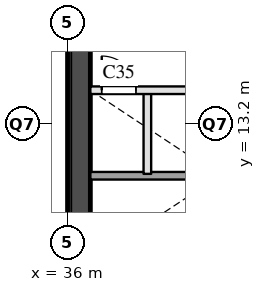
"""IFC4 building model, lengths in metres.
Left out: names, types, materials, properties, quantities, classifications, styles, units other than length and angle.
Written with IfcOpenShell. Run it as: python <this file> out.ifc"""

import sys

from ifc_helpers import new_model, si_unit, direction, frame, frame_2d, origin, place, context, subcontext, project, spatial, rectangle, extrude, element, fill, save


model = new_model("IFC4")
c1 = context("Model", 3, precision=1e-05, world=origin(), true_north=direction((0.0, 1.0)))
c2 = subcontext(c1, "Body", "Model", "MODEL_VIEW")
j1 = project(units=[si_unit("LENGTHUNIT", "METRE"), si_unit("PLANEANGLEUNIT", "RADIAN")], contexts=[c1])
p1 = place(None, origin())
s1 = spatial("IfcSite", under=j1, at=p1, CompositionType="ELEMENT")
p2 = place(p1, origin())
s2 = spatial("IfcBuilding", under=s1, at=p2, CompositionType="ELEMENT")
p3 = place(p2, frame((0.0, 0.0, 8.0)))
s3 = spatial("IfcBuildingStorey", under=s2, at=p3, CompositionType="ELEMENT", Elevation=8.0)
p4 = place(p3, frame((36.3, 9.6, 0.0), z_axis=(0.0, 0.0, 1.0), x_axis=(0.0, 1.0, 0.0)))
e1 = element("IfcWall", 1, at=p4, inside=s3, PredefinedType="SHEAR", context=c2, shape_type="SweptSolid", body=[
    extrude(rectangle(XDim=12.3, YDim=0.6, at=frame_2d((6.15, 0.0))), origin(), (0.0, 0.0, 1.0), 5.59),
])
p5 = place(p3, frame((38.1, 11.9, 0.0), z_axis=(0.0, 0.0, 1.0), x_axis=(0.0, 1.0, 0.0)))
e2 = element("IfcWall", 2, at=p5, inside=s3, PredefinedType="PARTITIONING", context=c2, shape_type="SweptSolid", body=[
    extrude(rectangle(XDim=2.2, YDim=0.2, at=frame_2d((1.1, 0.0))), origin(), (0.0, 0.0, 1.0), 5.59),
])
p6 = place(p3, frame((36.6, 11.85, 0.0), z_axis=(0.0, 0.0, 1.0), x_axis=(1.0, 0.0, 0.0)))
e3 = element("IfcWall", 3, at=p6, inside=s3, PredefinedType="SOLIDWALL", context=c2, shape_type="SweptSolid", body=[
    extrude(rectangle(XDim=7.8, YDim=0.2, at=frame_2d((3.9, 0.0))), origin(), (0.0, 0.0, 1.0), 5.59),
])
p7 = place(p3, frame((36.6, 14.1, 0.0), z_axis=(0.0, 0.0, 1.0), x_axis=(1.0, 0.0, 0.0)))
e4 = element("IfcWall", 4, at=p7, inside=s3, PredefinedType="PARTITIONING", context=c2, shape_type="SweptSolid", body=[
    extrude(rectangle(XDim=6.0, YDim=0.2, at=frame_2d((3.0, 0.0))), origin(), (0.0, 0.0, 1.0), 5.59),
])
p8 = place(p7, frame((0.3, 0.0, 0.0)))
e5 = element("IfcOpeningElement", 5, at=p8, cuts=e4, PredefinedType="OPENING", context=c2, shape_type="SweptSolid", body=[
    extrude(rectangle(XDim=0.9, YDim=2.1, at=frame_2d((0.45, 1.05))), frame((0.0, 0.11, 0.0), z_axis=(0.0, -1.0, 0.0), x_axis=(1.0, 0.0, 0.0)), (0.0, 0.0, 1.0), 0.22),
])
p9 = place(p7, frame((3.3, 0.0, 0.0)))
e6 = element("IfcOpeningElement", 6, at=p9, cuts=e4, PredefinedType="OPENING", context=c2, shape_type="SweptSolid", body=[
    extrude(rectangle(XDim=0.9, YDim=2.1, at=frame_2d((0.45, 1.05))), frame((0.0, 0.11, 0.0), z_axis=(0.0, -1.0, 0.0), x_axis=(1.0, 0.0, 0.0)), (0.0, 0.0, 1.0), 0.22),
])
p10 = place(p8, origin())
e7 = element("IfcDoor", 7, at=p10, inside=s3, OperationType="SINGLE_SWING_LEFT", PredefinedType="DOOR", context=c2, shape_type="SweptSolid", body=[
    extrude(rectangle(XDim=0.9, YDim=2.1, at=frame_2d((0.45, 1.05))), frame((0.0, 0.025, 0.0), z_axis=(0.0, -1.0, 0.0), x_axis=(1.0, 0.0, 0.0)), (0.0, 0.0, 1.0), 0.05),
])
fill(e5, e7)
save(model, sys.argv[1])
